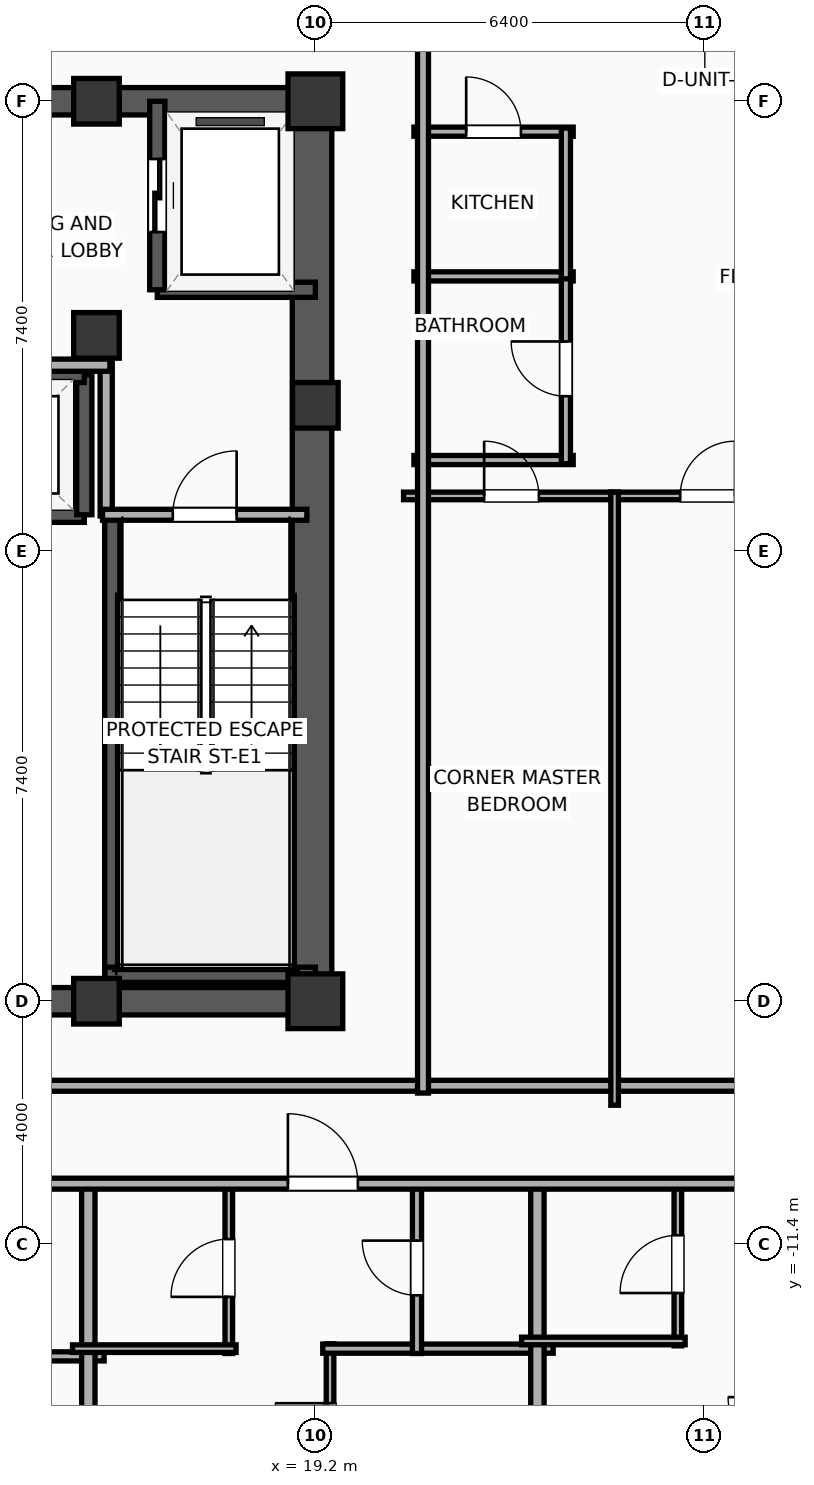
"""IFC4 building model, lengths in metres.
Left out: names, types, materials, properties, quantities, classifications, styles, units other than length and angle.
Written with IfcOpenShell. Run it as: python <this file> out.ifc"""

import sys

from ifc_helpers import new_model, si_unit, direction, frame, frame_2d, origin, origin_2d, place, context, subcontext, project, spatial, rectangle, extrude, element, fill, save


model = new_model("IFC4")
c1 = context("Model", 3, precision=1e-05, world=origin(), true_north=direction((0.0, 1.0)))
c2 = subcontext(c1, "Body", "Model", "MODEL_VIEW")
j1 = project(units=[si_unit("LENGTHUNIT", "METRE"), si_unit("PLANEANGLEUNIT", "RADIAN")], contexts=[c1])
p1 = place(None, origin())
s1 = spatial("IfcSite", under=j1, at=p1, CompositionType="ELEMENT")
p2 = place(p1, origin())
s2 = spatial("IfcBuilding", under=s1, at=p2, CompositionType="ELEMENT")
p3 = place(p2, frame((0.0, 0.0, 208.0)))
s3 = spatial("IfcBuildingStorey", under=s2, at=p3, CompositionType="ELEMENT", Elevation=208.0)
for number, where, z_axis, x_axis in (
    (1, (15.6, 3.55, 0.0), (0.0, 0.0, 1.0), (1.0, 0.0, 0.0)),
    (2, (15.6, -7.4, 0.0), (0.0, 0.0, 1.0), (1.0, 0.0, 0.0)),
    (3, (15.6, 7.4, 0.0), (0.0, 0.0, 1.0), (1.0, 0.0, 0.0)),
):
    element("IfcColumn", number, at=place(p3, frame(where, z_axis=z_axis, x_axis=x_axis)), inside=s3, PredefinedType="COLUMN", context=c2, shape_type="SweptSolid", body=[
        extrude(rectangle(XDim=0.75, YDim=0.75, at=origin_2d()), origin(), (0.0, 0.0, 1.0), 3.9),
    ])
p4 = place(p3, frame((19.2, -7.4, 0.0), z_axis=(0.0, 0.0, 1.0), x_axis=(1.0, 0.0, 0.0)))
e4 = element("IfcColumn", 4, at=p4, inside=s3, PredefinedType="COLUMN", context=c2, shape_type="SweptSolid", body=[
    extrude(rectangle(XDim=0.9, YDim=0.9, at=origin_2d()), origin(), (0.0, 0.0, 1.0), 3.9),
])
p5 = place(p3, frame((19.2, 2.4, 0.0), z_axis=(0.0, 0.0, 1.0), x_axis=(1.0, 0.0, 0.0)))
e5 = element("IfcColumn", 5, at=p5, inside=s3, PredefinedType="COLUMN", context=c2, shape_type="SweptSolid", body=[
    extrude(rectangle(XDim=0.75, YDim=0.75, at=origin_2d()), origin(), (0.0, 0.0, 1.0), 3.9),
])
p6 = place(p3, frame((19.2, 7.4, 0.0), z_axis=(0.0, 0.0, 1.0), x_axis=(1.0, 0.0, 0.0)))
e6 = element("IfcColumn", 6, at=p6, inside=s3, PredefinedType="COLUMN", context=c2, shape_type="SweptSolid", body=[
    extrude(rectangle(XDim=0.9, YDim=0.9, at=origin_2d()), origin(), (0.0, 0.0, 1.0), 3.9),
])
for number, where, z_axis, x_axis in (
    (7, (12.175, -7.4, 0.0), (0.0, 0.0, 1.0), (1.0, 0.0, 0.0)),
    (8, (12.175, 7.4, 0.0), (0.0, 0.0, 1.0), (1.0, 0.0, 0.0)),
):
    element("IfcWall", number, at=place(p3, frame(where, z_axis=z_axis, x_axis=x_axis)), inside=s3, PredefinedType="SHEAR", context=c2, shape_type="SweptSolid", body=[
        extrude(rectangle(XDim=7.25, YDim=0.45, at=frame_2d((3.625, 0.0))), origin(), (0.0, 0.0, 1.0), 3.65),
    ])
p7 = place(p3, frame((19.145, -7.4, 0.0), z_axis=(0.0, 0.0, 1.0), x_axis=(0.0, 1.0, 0.0)))
e9 = element("IfcWall", 9, at=p7, inside=s3, PredefinedType="SHEAR", context=c2, shape_type="SweptSolid", body=[
    extrude(rectangle(XDim=14.8, YDim=0.65, at=frame_2d((7.4, 0.0))), origin(), (0.0, 0.0, 1.0), 3.65),
])
p8 = place(p3, frame((15.86, -7.085, 0.0), z_axis=(0.0, 0.0, 1.0), x_axis=(0.0, 1.0, 0.0)))
e10 = element("IfcWall", 10, at=p8, inside=s3, PredefinedType="SOLIDWALL", context=c2, shape_type="SweptSolid", body=[
    extrude(rectangle(XDim=7.685, YDim=0.25, at=frame_2d((3.843, 0.0))), origin(), (0.0, 0.0, 1.0), 3.65),
])
p9 = place(p3, frame((15.74, -6.965, 0.0), z_axis=(0.0, 0.0, 1.0), x_axis=(1.0, 0.0, 0.0)))
e11 = element("IfcWall", 11, at=p9, inside=s3, PredefinedType="SOLIDWALL", context=c2, shape_type="SweptSolid", body=[
    extrude(rectangle(XDim=3.46, YDim=0.25, at=frame_2d((1.73, 0.0))), origin(), (0.0, 0.0, 1.0), 3.65),
])
p10 = place(p3, frame((16.6, 4.3, 0.0), z_axis=(0.0, 0.0, 1.0), x_axis=(1.0, 0.0, 0.0)))
e12 = element("IfcWall", 12, at=p10, inside=s3, PredefinedType="SOLIDWALL", context=c2, shape_type="SweptSolid", body=[
    extrude(rectangle(XDim=2.6, YDim=0.25, at=frame_2d((1.3, 0.0))), origin(), (0.0, 0.0, 1.0), 3.65),
])
p11 = place(p3, frame((16.6, 7.4, 0.0), z_axis=(0.0, 0.0, 1.0), x_axis=(0.0, -1.0, 0.0)))
e13 = element("IfcWall", 13, at=p11, inside=s3, PredefinedType="SOLIDWALL", context=c2, shape_type="SweptSolid", body=[
    extrude(rectangle(XDim=3.1, YDim=0.25, at=frame_2d((1.55, 0.0))), origin(), (0.0, 0.0, 1.0), 3.65),
])
p12 = place(p11, frame((0.95, 0.0, 0.0)))
e14 = element("IfcOpeningElement", 14, at=p12, cuts=e13, PredefinedType="OPENING", context=c2, shape_type="SweptSolid", body=[
    extrude(rectangle(XDim=1.2, YDim=2.05, at=frame_2d((0.6, 1.025))), frame((0.0, 0.135, 0.0), z_axis=(0.0, -1.0, 0.0), x_axis=(1.0, 0.0, 0.0)), (0.0, 0.0, 1.0), 0.27),
])
p13 = place(p3, frame((12.4, 0.6, 0.0), z_axis=(0.0, 0.0, 1.0), x_axis=(1.0, 0.0, 0.0)))
e15 = element("IfcWall", 15, at=p13, inside=s3, PredefinedType="SOLIDWALL", context=c2, shape_type="SweptSolid", body=[
    extrude(rectangle(XDim=3.0, YDim=0.25, at=frame_2d((1.5, 0.0))), origin(), (0.0, 0.0, 1.0), 3.65),
])
p14 = place(p3, frame((15.4, 0.6, 0.0), z_axis=(0.0, 0.0, 1.0), x_axis=(0.0, 1.0, 0.0)))
e16 = element("IfcWall", 16, at=p14, inside=s3, PredefinedType="SOLIDWALL", context=c2, shape_type="SweptSolid", body=[
    extrude(rectangle(XDim=2.3, YDim=0.25, at=frame_2d((1.15, 0.0))), origin(), (0.0, 0.0, 1.0), 3.65),
])
p15 = place(p3, frame((15.4, 2.9, 0.0), z_axis=(0.0, 0.0, 1.0), x_axis=(-1.0, 0.0, 0.0)))
e17 = element("IfcWall", 17, at=p15, inside=s3, PredefinedType="SOLIDWALL", context=c2, shape_type="SweptSolid", body=[
    extrude(rectangle(XDim=3.0, YDim=0.25, at=frame_2d((1.5, 0.0))), origin(), (0.0, 0.0, 1.0), 3.65),
])
p16 = place(p3, frame((15.76, 0.58, 0.0), z_axis=(0.0, 0.0, 1.0), x_axis=(0.0, 1.0, 0.0)))
e18 = element("IfcWall", 18, at=p16, inside=s3, PredefinedType="PARTITIONING", context=c2, shape_type="SweptSolid", body=[
    extrude(rectangle(XDim=2.52, YDim=0.2, at=frame_2d((1.26, 0.0))), origin(), (0.0, 0.0, 1.0), 3.65),
])
p17 = place(p3, frame((12.66, 3.06, 0.0), z_axis=(0.0, 0.0, 1.0), x_axis=(1.0, 0.0, 0.0)))
e19 = element("IfcWall", 19, at=p17, inside=s3, PredefinedType="PARTITIONING", context=c2, shape_type="SweptSolid", body=[
    extrude(rectangle(XDim=3.16, YDim=0.2, at=frame_2d((1.58, 0.0))), origin(), (0.0, 0.0, 1.0), 3.65),
])
p18 = place(p3, frame((15.7, 0.6, 0.0), z_axis=(0.0, 0.0, 1.0), x_axis=(1.0, 0.0, 0.0)))
e20 = element("IfcWall", 20, at=p18, inside=s3, PredefinedType="PARTITIONING", context=c2, shape_type="SweptSolid", body=[
    extrude(rectangle(XDim=3.36, YDim=0.18, at=frame_2d((1.68, 0.0))), origin(), (0.0, 0.0, 1.0), 3.65),
])
p19 = place(p18, frame((1.155, 0.0, 0.0)))
e21 = element("IfcOpeningElement", 21, at=p19, cuts=e20, PredefinedType="OPENING", context=c2, shape_type="SweptSolid", body=[
    extrude(rectangle(XDim=1.05, YDim=2.05, at=frame_2d((0.525, 1.025))), frame((0.0, 0.1, 0.0), z_axis=(0.0, -1.0, 0.0), x_axis=(1.0, 0.0, 0.0)), (0.0, 0.0, 1.0), 0.2),
])
p20 = place(p3, frame((9.88, -8.79, 0.0), z_axis=(0.0, 0.0, 1.0), x_axis=(1.0, 0.0, 0.0)))
e22 = element("IfcWall", 22, at=p20, inside=s3, PredefinedType="PARTITIONING", context=c2, shape_type="SweptSolid", body=[
    extrude(rectangle(XDim=20.35, YDim=0.18, at=frame_2d((10.175, 0.0))), origin(), (0.0, 0.0, 1.0), 3.65),
])
p21 = place(p3, frame((11.936, -13.24, 0.0), z_axis=(0.0, 0.0, 1.0), x_axis=(1.0, 0.0, 0.0)))
e23 = element("IfcWall", 23, at=p21, inside=s3, PredefinedType="PLUMBINGWALL", context=c2, shape_type="SweptSolid", body=[
    extrude(rectangle(XDim=3.79, YDim=0.15, at=frame_2d((1.895, 0.0))), origin(), (0.0, 0.0, 1.0), 3.65),
])
p22 = place(p3, frame((15.466, -18.83, 0.0), z_axis=(0.0, 0.0, 1.0), x_axis=(0.0, 1.0, 0.0)))
e24 = element("IfcWall", 24, at=p22, inside=s3, PredefinedType="PARTITIONING", context=c2, shape_type="SweptSolid", body=[
    extrude(rectangle(XDim=8.51, YDim=0.22, at=frame_2d((4.255, 0.0))), origin(), (0.0, 0.0, 1.0), 3.65),
])
p23 = place(p3, frame((19.441, -18.98, 0.0), z_axis=(0.0, 0.0, 1.0), x_axis=(0.0, 1.0, 0.0)))
e25 = element("IfcWall", 25, at=p23, inside=s3, PredefinedType="PARTITIONING", context=c2, shape_type="SweptSolid", body=[
    extrude(rectangle(XDim=5.947, YDim=0.125, at=frame_2d((2.974, 0.0))), origin(), (0.0, 0.0, 1.0), 3.65),
])
p24 = place(p23, frame((4.07, 0.0, 0.0)))
e26 = element("IfcOpeningElement", 26, at=p24, cuts=e25, PredefinedType="OPENING", context=c2, shape_type="SweptSolid", body=[
    extrude(rectangle(XDim=0.9, YDim=2.05, at=frame_2d((0.45, 1.025))), frame((0.0, 0.073, 0.0), z_axis=(0.0, -1.0, 0.0), x_axis=(1.0, 0.0, 0.0)), (0.0, 0.0, 1.0), 0.145),
])
p25 = place(p3, frame((19.321, -13.113, 0.0), z_axis=(0.0, 0.0, 1.0), x_axis=(1.0, 0.0, 0.0)))
e27 = element("IfcWall", 27, at=p25, inside=s3, PredefinedType="PLUMBINGWALL", context=c2, shape_type="SweptSolid", body=[
    extrude(rectangle(XDim=3.79, YDim=0.15, at=frame_2d((1.895, 0.0))), origin(), (0.0, 0.0, 1.0), 3.65),
])
p26 = place(p3, frame((17.776, -13.193, 0.0), z_axis=(0.0, 0.0, 1.0), x_axis=(0.0, 1.0, 0.0)))
e28 = element("IfcWall", 28, at=p26, inside=s3, PredefinedType="PARTITIONING", context=c2, shape_type="SweptSolid", body=[
    extrude(rectangle(XDim=2.813, YDim=0.125, at=frame_2d((1.407, 0.0))), origin(), (0.0, 0.0, 1.0), 3.65),
])
p27 = place(p26, frame((0.931, 0.0, 0.0)))
e29 = element("IfcOpeningElement", 29, at=p27, cuts=e28, PredefinedType="OPENING", context=c2, shape_type="SweptSolid", body=[
    extrude(rectangle(XDim=0.95, YDim=2.05, at=frame_2d((0.475, 1.025))), frame((0.0, 0.073, 0.0), z_axis=(0.0, -1.0, 0.0), x_axis=(1.0, 0.0, 0.0)), (0.0, 0.0, 1.0), 0.145),
])
p28 = place(p3, frame((15.206, -13.113, 0.0), z_axis=(0.0, 0.0, 1.0), x_axis=(1.0, 0.0, 0.0)))
e30 = element("IfcWall", 30, at=p28, inside=s3, PredefinedType="PARTITIONING", context=c2, shape_type="SweptSolid", body=[
    extrude(rectangle(XDim=2.69, YDim=0.125, at=frame_2d((1.345, 0.0))), origin(), (0.0, 0.0, 1.0), 3.65),
])
p29 = place(p3, frame((20.871, -13.193, 0.0), z_axis=(0.0, 0.0, 1.0), x_axis=(0.0, 1.0, 0.0)))
e31 = element("IfcWall", 31, at=p29, inside=s3, PredefinedType="PLUMBINGWALL", context=c2, shape_type="SweptSolid", body=[
    extrude(rectangle(XDim=2.813, YDim=0.15, at=frame_2d((1.407, 0.0))), origin(), (0.0, 0.0, 1.0), 3.65),
])
p30 = place(p29, frame((0.957, 0.0, 0.0)))
e32 = element("IfcOpeningElement", 32, at=p30, cuts=e31, PredefinedType="OPENING", context=c2, shape_type="SweptSolid", body=[
    extrude(rectangle(XDim=0.9, YDim=2.05, at=frame_2d((0.45, 1.025))), frame((0.0, 0.085, 0.0), z_axis=(0.0, -1.0, 0.0), x_axis=(1.0, 0.0, 0.0)), (0.0, 0.0, 1.0), 0.17),
])
p31 = place(p3, frame((22.851, -18.83, 0.0), z_axis=(0.0, 0.0, 1.0), x_axis=(0.0, 1.0, 0.0)))
e33 = element("IfcWall", 33, at=p31, inside=s3, PredefinedType="PARTITIONING", context=c2, shape_type="SweptSolid", body=[
    extrude(rectangle(XDim=8.51, YDim=0.22, at=frame_2d((4.255, 0.0))), origin(), (0.0, 0.0, 1.0), 3.65),
])
p32 = place(p3, frame((25.161, -13.067, 0.0), z_axis=(0.0, 0.0, 1.0), x_axis=(0.0, 1.0, 0.0)))
e34 = element("IfcWall", 34, at=p32, inside=s3, PredefinedType="PARTITIONING", context=c2, shape_type="SweptSolid", body=[
    extrude(rectangle(XDim=2.687, YDim=0.125, at=frame_2d((1.344, 0.0))), origin(), (0.0, 0.0, 1.0), 3.65),
])
p33 = place(p32, frame((0.868, 0.0, 0.0)))
e35 = element("IfcOpeningElement", 35, at=p33, cuts=e34, PredefinedType="OPENING", context=c2, shape_type="SweptSolid", body=[
    extrude(rectangle(XDim=0.95, YDim=2.05, at=frame_2d((0.475, 1.025))), frame((0.0, 0.073, 0.0), z_axis=(0.0, -1.0, 0.0), x_axis=(1.0, 0.0, 0.0)), (0.0, 0.0, 1.0), 0.145),
])
p34 = place(p3, frame((22.591, -12.987, 0.0), z_axis=(0.0, 0.0, 1.0), x_axis=(1.0, 0.0, 0.0)))
e36 = element("IfcWall", 36, at=p34, inside=s3, PredefinedType="PARTITIONING", context=c2, shape_type="SweptSolid", body=[
    extrude(rectangle(XDim=2.69, YDim=0.125, at=frame_2d((1.345, 0.0))), origin(), (0.0, 0.0, 1.0), 3.65),
])
p35 = place(p3, frame((8.08, -10.4, 0.0), z_axis=(0.0, 0.0, 1.0), x_axis=(1.0, 0.0, 0.0)))
e37 = element("IfcWall", 37, at=p35, inside=s3, PredefinedType="PARTITIONING", context=c2, shape_type="SweptSolid", body=[
    extrude(rectangle(XDim=22.15, YDim=0.18, at=frame_2d((11.075, 0.0))), origin(), (0.0, 0.0, 1.0), 3.65),
])
p36 = place(p35, frame((3.283, 0.0, 0.0)))
e38 = element("IfcOpeningElement", 38, at=p36, cuts=e37, PredefinedType="OPENING", context=c2, shape_type="SweptSolid", body=[
    extrude(rectangle(XDim=1.15, YDim=2.05, at=frame_2d((0.575, 1.025))), frame((0.0, 0.1, 0.0), z_axis=(0.0, -1.0, 0.0), x_axis=(1.0, 0.0, 0.0)), (0.0, 0.0, 1.0), 0.2),
])
p37 = place(p35, frame((10.668, 0.0, 0.0)))
e39 = element("IfcOpeningElement", 39, at=p37, cuts=e37, PredefinedType="OPENING", context=c2, shape_type="SweptSolid", body=[
    extrude(rectangle(XDim=1.15, YDim=2.05, at=frame_2d((0.575, 1.025))), frame((0.0, 0.1, 0.0), z_axis=(0.0, -1.0, 0.0), x_axis=(1.0, 0.0, 0.0)), (0.0, 0.0, 1.0), 0.2),
])
p38 = place(p35, frame((18.084, 0.0, 0.0)))
e40 = element("IfcOpeningElement", 40, at=p38, cuts=e37, PredefinedType="OPENING", context=c2, shape_type="SweptSolid", body=[
    extrude(rectangle(XDim=1.15, YDim=2.05, at=frame_2d((0.575, 1.025))), frame((0.0, 0.1, 0.0), z_axis=(0.0, -1.0, 0.0), x_axis=(1.0, 0.0, 0.0)), (0.0, 0.0, 1.0), 0.2),
])
p39 = place(p3, frame((20.82, 6.9, 0.0), z_axis=(0.0, 0.0, 1.0), x_axis=(1.0, 0.0, 0.0)))
e41 = element("IfcWall", 41, at=p39, inside=s3, PredefinedType="PLUMBINGWALL", context=c2, shape_type="SweptSolid", body=[
    extrude(rectangle(XDim=2.62, YDim=0.15, at=frame_2d((1.31, 0.0))), origin(), (0.0, 0.0, 1.0), 3.65),
])
p40 = place(p39, frame((0.86, 0.0, 0.0)))
e42 = element("IfcOpeningElement", 42, at=p40, cuts=e41, PredefinedType="OPENING", context=c2, shape_type="SweptSolid", body=[
    extrude(rectangle(XDim=0.9, YDim=2.05, at=frame_2d((0.45, 1.025))), frame((0.0, 0.085, 0.0), z_axis=(0.0, -1.0, 0.0), x_axis=(1.0, 0.0, 0.0)), (0.0, 0.0, 1.0), 0.17),
])
for number, where, z_axis, x_axis in (
    (43, (20.82, 4.52, 0.0), (0.0, 0.0, 1.0), (1.0, 0.0, 0.0)),
    (44, (20.82, 1.5, 0.0), (0.0, 0.0, 1.0), (1.0, 0.0, 0.0)),
):
    element("IfcWall", number, at=place(p3, frame(where, z_axis=z_axis, x_axis=x_axis)), inside=s3, PredefinedType="PLUMBINGWALL", context=c2, shape_type="SweptSolid", body=[
        extrude(rectangle(XDim=2.62, YDim=0.15, at=frame_2d((1.31, 0.0))), origin(), (0.0, 0.0, 1.0), 3.65),
    ])
p41 = place(p3, frame((23.32, 1.44, 0.0), z_axis=(0.0, 0.0, 1.0), x_axis=(0.0, 1.0, 0.0)))
e45 = element("IfcWall", 45, at=p41, inside=s3, PredefinedType="PLUMBINGWALL", context=c2, shape_type="SweptSolid", body=[
    extrude(rectangle(XDim=3.12, YDim=0.15, at=frame_2d((1.56, 0.0))), origin(), (0.0, 0.0, 1.0), 3.65),
])
p42 = place(p41, frame((1.11, 0.0, 0.0)))
e46 = element("IfcOpeningElement", 46, at=p42, cuts=e45, PredefinedType="OPENING", context=c2, shape_type="SweptSolid", body=[
    extrude(rectangle(XDim=0.9, YDim=2.05, at=frame_2d((0.45, 1.025))), frame((0.0, 0.085, 0.0), z_axis=(0.0, -1.0, 0.0), x_axis=(1.0, 0.0, 0.0)), (0.0, 0.0, 1.0), 0.17),
])
p43 = place(p3, frame((23.32, 4.48, 0.0), z_axis=(0.0, 0.0, 1.0), x_axis=(0.0, 1.0, 0.0)))
e47 = element("IfcWall", 47, at=p43, inside=s3, PredefinedType="PLUMBINGWALL", context=c2, shape_type="SweptSolid", body=[
    extrude(rectangle(XDim=2.48, YDim=0.15, at=frame_2d((1.24, 0.0))), origin(), (0.0, 0.0, 1.0), 3.65),
])
p44 = place(p3, frame((20.65, 0.91, 0.0), z_axis=(0.0, 0.0, 1.0), x_axis=(1.0, 0.0, 0.0)))
e48 = element("IfcWall", 48, at=p44, inside=s3, PredefinedType="PARTITIONING", context=c2, shape_type="SweptSolid", body=[
    extrude(rectangle(XDim=3.534, YDim=0.125, at=frame_2d((1.767, 0.0))), origin(), (0.0, 0.0, 1.0), 3.65),
])
p45 = place(p44, frame((1.325, 0.0, 0.0)))
e49 = element("IfcOpeningElement", 49, at=p45, cuts=e48, PredefinedType="OPENING", context=c2, shape_type="SweptSolid", body=[
    extrude(rectangle(XDim=0.9, YDim=2.05, at=frame_2d((0.45, 1.025))), frame((0.0, 0.073, 0.0), z_axis=(0.0, -1.0, 0.0), x_axis=(1.0, 0.0, 0.0)), (0.0, 0.0, 1.0), 0.145),
])
p46 = place(p3, frame((24.059, 0.91, 0.0), z_axis=(0.0, 0.0, 1.0), x_axis=(1.0, 0.0, 0.0)))
e50 = element("IfcWall", 50, at=p46, inside=s3, PredefinedType="PARTITIONING", context=c2, shape_type="SweptSolid", body=[
    extrude(rectangle(XDim=3.183, YDim=0.125, at=frame_2d((1.591, 0.0))), origin(), (0.0, 0.0, 1.0), 3.65),
])
p47 = place(p46, frame((1.142, 0.0, 0.0)))
e51 = element("IfcOpeningElement", 51, at=p47, cuts=e50, PredefinedType="OPENING", context=c2, shape_type="SweptSolid", body=[
    extrude(rectangle(XDim=0.9, YDim=2.05, at=frame_2d((0.45, 1.025))), frame((0.0, 0.073, 0.0), z_axis=(0.0, -1.0, 0.0), x_axis=(1.0, 0.0, 0.0)), (0.0, 0.0, 1.0), 0.145),
])
p48 = place(p3, frame((24.121, -9.11, 0.0), z_axis=(0.0, 0.0, 1.0), x_axis=(0.0, 1.0, 0.0)))
e52 = element("IfcWall", 52, at=p48, inside=s3, PredefinedType="PARTITIONING", context=c2, shape_type="SweptSolid", body=[
    extrude(rectangle(XDim=10.08, YDim=0.125, at=frame_2d((5.04, 0.0))), origin(), (0.0, 0.0, 1.0), 3.65),
])
p49 = place(p3, frame((20.97, -8.91, 0.0), z_axis=(0.0, 0.0, 1.0), x_axis=(0.0, 1.0, 0.0)))
e53 = element("IfcWall", 53, at=p49, inside=s3, PredefinedType="PARTITIONING", context=c2, shape_type="SweptSolid", body=[
    extrude(rectangle(XDim=17.82, YDim=0.18, at=frame_2d((8.91, 0.0))), origin(), (0.0, 0.0, 1.0), 3.65),
])
p50 = place(p12, origin())
e54 = element("IfcDoor", 54, at=p50, inside=s3, OperationType="SLIDING_TO_LEFT", PredefinedType="DOOR", context=c2, shape_type="SweptSolid", body=[
    extrude(rectangle(XDim=1.2, YDim=2.05, at=frame_2d((0.6, 1.025))), frame((0.0, 0.025, 0.0), z_axis=(0.0, -1.0, 0.0), x_axis=(1.0, 0.0, 0.0)), (0.0, 0.0, 1.0), 0.05),
])
fill(e14, e54)
p51 = place(p19, origin())
e55 = element("IfcDoor", 55, at=p51, inside=s3, OperationType="SINGLE_SWING_RIGHT", PredefinedType="DOOR", context=c2, shape_type="SweptSolid", body=[
    extrude(rectangle(XDim=1.05, YDim=2.05, at=frame_2d((0.525, 1.025))), frame((0.0, 0.025, 0.0), z_axis=(0.0, -1.0, 0.0), x_axis=(1.0, 0.0, 0.0)), (0.0, 0.0, 1.0), 0.05),
])
fill(e21, e55)
p52 = place(p24, origin())
e56 = element("IfcDoor", 56, at=p52, inside=s3, OperationType="SINGLE_SWING_RIGHT", PredefinedType="DOOR", context=c2, shape_type="SweptSolid", body=[
    extrude(rectangle(XDim=0.9, YDim=2.05, at=frame_2d((0.45, 1.025))), frame((0.0, 0.025, 0.0), z_axis=(0.0, -1.0, 0.0), x_axis=(1.0, 0.0, 0.0)), (0.0, 0.0, 1.0), 0.05),
])
fill(e26, e56)
p53 = place(p27, origin())
e57 = element("IfcDoor", 57, at=p53, inside=s3, OperationType="SINGLE_SWING_LEFT", PredefinedType="DOOR", context=c2, shape_type="SweptSolid", body=[
    extrude(rectangle(XDim=0.95, YDim=2.05, at=frame_2d((0.475, 1.025))), frame((0.0, 0.025, 0.0), z_axis=(0.0, -1.0, 0.0), x_axis=(1.0, 0.0, 0.0)), (0.0, 0.0, 1.0), 0.05),
])
fill(e29, e57)
p54 = place(p30, origin())
e58 = element("IfcDoor", 58, at=p54, inside=s3, OperationType="SINGLE_SWING_RIGHT", PredefinedType="DOOR", context=c2, shape_type="SweptSolid", body=[
    extrude(rectangle(XDim=0.9, YDim=2.05, at=frame_2d((0.45, 1.025))), frame((0.0, 0.025, 0.0), z_axis=(0.0, -1.0, 0.0), x_axis=(1.0, 0.0, 0.0)), (0.0, 0.0, 1.0), 0.05),
])
fill(e32, e58)
p55 = place(p33, origin())
e59 = element("IfcDoor", 59, at=p55, inside=s3, OperationType="SINGLE_SWING_LEFT", PredefinedType="DOOR", context=c2, shape_type="SweptSolid", body=[
    extrude(rectangle(XDim=0.95, YDim=2.05, at=frame_2d((0.475, 1.025))), frame((0.0, 0.025, 0.0), z_axis=(0.0, -1.0, 0.0), x_axis=(1.0, 0.0, 0.0)), (0.0, 0.0, 1.0), 0.05),
])
fill(e35, e59)
p56 = place(p37, origin())
e60 = element("IfcDoor", 60, at=p56, inside=s3, OperationType="SINGLE_SWING_LEFT", PredefinedType="DOOR", context=c2, shape_type="SweptSolid", body=[
    extrude(rectangle(XDim=1.15, YDim=2.05, at=frame_2d((0.575, 1.025))), frame((0.0, 0.025, 0.0), z_axis=(0.0, -1.0, 0.0), x_axis=(1.0, 0.0, 0.0)), (0.0, 0.0, 1.0), 0.05),
])
fill(e39, e60)
p57 = place(p40, origin())
e61 = element("IfcDoor", 61, at=p57, inside=s3, OperationType="SINGLE_SWING_LEFT", PredefinedType="DOOR", context=c2, shape_type="SweptSolid", body=[
    extrude(rectangle(XDim=0.9, YDim=2.05, at=frame_2d((0.45, 1.025))), frame((0.0, 0.025, 0.0), z_axis=(0.0, -1.0, 0.0), x_axis=(1.0, 0.0, 0.0)), (0.0, 0.0, 1.0), 0.05),
])
fill(e42, e61)
p58 = place(p42, origin())
e62 = element("IfcDoor", 62, at=p58, inside=s3, OperationType="SINGLE_SWING_RIGHT", PredefinedType="DOOR", context=c2, shape_type="SweptSolid", body=[
    extrude(rectangle(XDim=0.9, YDim=2.05, at=frame_2d((0.45, 1.025))), frame((0.0, 0.025, 0.0), z_axis=(0.0, -1.0, 0.0), x_axis=(1.0, 0.0, 0.0)), (0.0, 0.0, 1.0), 0.05),
])
fill(e46, e62)
p59 = place(p45, origin())
e63 = element("IfcDoor", 63, at=p59, inside=s3, OperationType="SINGLE_SWING_LEFT", PredefinedType="DOOR", context=c2, shape_type="SweptSolid", body=[
    extrude(rectangle(XDim=0.9, YDim=2.05, at=frame_2d((0.45, 1.025))), frame((0.0, 0.025, 0.0), z_axis=(0.0, -1.0, 0.0), x_axis=(1.0, 0.0, 0.0)), (0.0, 0.0, 1.0), 0.05),
])
fill(e49, e63)
p60 = place(p47, origin())
e64 = element("IfcDoor", 64, at=p60, inside=s3, OperationType="SINGLE_SWING_RIGHT", PredefinedType="DOOR", context=c2, shape_type="SweptSolid", body=[
    extrude(rectangle(XDim=0.9, YDim=2.05, at=frame_2d((0.45, 1.025))), frame((0.0, 0.025, 0.0), z_axis=(0.0, -1.0, 0.0), x_axis=(1.0, 0.0, 0.0)), (0.0, 0.0, 1.0), 0.05),
])
fill(e51, e64)
save(model, sys.argv[1])
